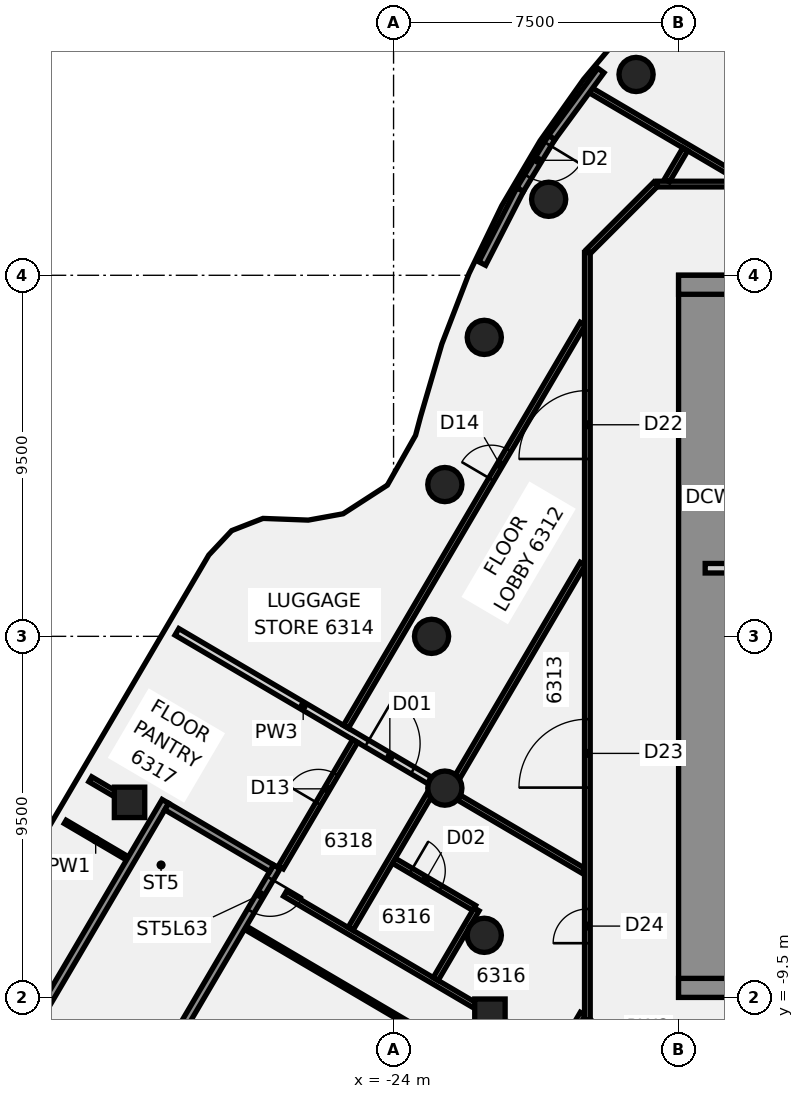
"""IFC4 building model, lengths in metres.
Left out: names, types, materials, properties, quantities, classifications, styles, units other than length and angle.
Written with IfcOpenShell. Run it as: python <this file> out.ifc"""

import sys

from ifc_helpers import new_model, si_unit, direction, frame, frame_2d, origin, origin_2d, place, context, subcontext, project, spatial, polyline, rectangle, circle, outline, extrude, element, fill, save


model = new_model("IFC4")
c1 = context("Model", 3, precision=1e-05, world=origin(), true_north=direction((0.0, 1.0)))
c2 = subcontext(c1, "Body", "Model", "MODEL_VIEW")
j1 = project(units=[si_unit("LENGTHUNIT", "METRE"), si_unit("PLANEANGLEUNIT", "RADIAN")], contexts=[c1])
p1 = place(None, origin())
s1 = spatial("IfcSite", under=j1, at=p1, CompositionType="ELEMENT")
p2 = place(p1, origin())
s2 = spatial("IfcBuilding", under=s1, at=p2, CompositionType="ELEMENT")
p3 = place(p2, frame((0.0, 0.0, 248.7)))
s3 = spatial("IfcBuildingStorey", under=s2, at=p3, CompositionType="ELEMENT", Elevation=248.7)
for number, where, z_axis, x_axis in (
    (1, (-17.619, 14.784, -0.14), (0.0, 0.0, 1.0), (1.0, 0.0, 0.0)),
    (2, (-19.919, 11.5, -0.14), (0.0, 0.0, 1.0), (1.0, 0.0, 0.0)),
    (3, (-21.613, 7.866, -0.14), (0.0, 0.0, 1.0), (1.0, 0.0, 0.0)),
    (4, (-22.651, 3.994, -0.14), (0.0, 0.0, 1.0), (1.0, 0.0, 0.0)),
    (5, (-23.0, 0.0, -0.14), (0.0, 0.0, 1.0), (1.0, 0.0, 0.0)),
    (6, (-22.651, -3.994, -0.14), (0.0, 0.0, 1.0), (1.0, 0.0, 0.0)),
    (7, (-21.613, -7.866, -0.14), (0.0, 0.0, 1.0), (1.0, 0.0, 0.0)),
):
    element("IfcColumn", number, at=place(p3, frame(where, z_axis=z_axis, x_axis=x_axis)), inside=s3, PredefinedType="COLUMN", context=c2, shape_type="SweptSolid", body=[
        extrude(circle(Radius=0.45, at=origin_2d()), origin(), (0.0, 0.0, 1.0), 3.56),
    ])
for number, where, z_axis, x_axis in (
    (8, (-21.464, -9.942, -0.139), (0.051, 0.003, 0.999), (-0.861, 0.507, 0.042)),
    (9, (-30.948, -4.368, -0.139), (0.023, -0.046, 0.999), (0.507, 0.861, 0.028)),
):
    element("IfcColumn", number, at=place(p3, frame(where, z_axis=z_axis, x_axis=x_axis)), inside=s3, PredefinedType="COLUMN", context=c2, shape_type="SweptSolid", body=[
        extrude(rectangle(XDim=0.8, YDim=0.8, at=origin_2d()), origin(), (0.0, 0.0, 1.0), 3.548),
    ])
p4 = place(p3, frame((-18.872, -10.128, 0.0), z_axis=(0.0, 0.0, 1.0), x_axis=(0.707106781187, -0.707106781187, 0.0)))
e10 = element("IfcWall", 10, at=p4, inside=s3, PredefinedType="PARTITIONING", context=c2, shape_type="SweptSolid", body=[
    extrude(rectangle(XDim=2.465, YDim=0.15, at=frame_2d((1.232, 0.0))), origin(), (0.0, 0.0, 1.0), 2.824),
])
p5 = place(p3, frame((-32.64, -4.882, 0.0), z_axis=(0.0, 0.0, 1.0), x_axis=(0.862207561559, -0.506555150789, 0.0)))
e11 = element("IfcWall", 11, at=p5, inside=s3, PredefinedType="PARTITIONING", context=c2, shape_type="SweptSolid", body=[
    extrude(rectangle(XDim=1.859, YDim=0.1, at=frame_2d((0.929, 0.0))), origin(), (0.0, 0.0, 1.0), 2.82),
])
p6 = place(p3, frame((-27.865, -7.687, 0.0), z_axis=(0.0, 0.0, 1.0), x_axis=(0.862208691121, -0.506553228156, 0.0)))
e12 = element("IfcWall", 12, at=p6, inside=s3, PredefinedType="PARTITIONING", context=c2, shape_type="SweptSolid", body=[
    extrude(rectangle(XDim=8.685, YDim=0.1, at=frame_2d((4.343, 0.0))), origin(), (0.0, 0.0, 1.0), 2.82),
])
p7 = place(p3, frame((-31.981, -3.76, 0.0), z_axis=(0.0, 0.0, 1.0), x_axis=(0.86206768602, -0.506793157728, 0.0)))
e13 = element("IfcWall", 13, at=p7, inside=s3, PredefinedType="PARTITIONING", context=c2, shape_type="SweptSolid", body=[
    extrude(rectangle(XDim=0.799, YDim=0.15, at=frame_2d((0.4, 0.0))), origin(), (0.0, 0.0, 1.0), 2.824),
])
p8 = place(p3, frame((-26.857, -6.773, 0.0), z_axis=(0.0, 0.0, 1.0), x_axis=(0.862091797668, -0.506752140985, 0.0)))
e14 = element("IfcWall", 14, at=p8, inside=s3, PredefinedType="PARTITIONING", context=c2, shape_type="SweptSolid", body=[
    extrude(rectangle(XDim=5.853, YDim=0.15, at=frame_2d((2.927, 0.0))), origin(), (0.0, 0.0, 1.0), 2.82),
])
p9 = place(p3, frame((-29.701, 0.118, 0.0), z_axis=(0.0, 0.0, 1.0), x_axis=(0.862110841902, -0.506719741351, 0.0)))
e15 = element("IfcWall", 15, at=p9, inside=s3, PredefinedType="PARTITIONING", context=c2, shape_type="SweptSolid", body=[
    extrude(rectangle(XDim=7.708, YDim=0.2, at=frame_2d((3.854, 0.0))), origin(), (0.0, 0.0, 1.0), 2.824),
])
p10 = place(p9, frame((5.799, 0.0, 0.0)))
e16 = element("IfcOpeningElement", 16, at=p10, cuts=e15, PredefinedType="OPENING", context=c2, shape_type="SweptSolid", body=[
    extrude(rectangle(XDim=1.4, YDim=2.1, at=frame_2d((0.7, 1.05))), frame((0.0, 0.11, 0.0), z_axis=(0.0, -1.0, 0.0), x_axis=(1.0, 0.0, 0.0)), (0.0, 0.0, 1.0), 0.22),
])
p11 = place(p3, frame((-22.275, -4.246, 0.0), z_axis=(0.0, 0.0, 1.0), x_axis=(0.862128807231, -0.506689174685, 0.0)))
e17 = element("IfcWall", 17, at=p11, inside=s3, PredefinedType="PARTITIONING", context=c2, shape_type="SweptSolid", body=[
    extrude(rectangle(XDim=3.805, YDim=0.15, at=frame_2d((1.902, 0.0))), origin(), (0.0, 0.0, 1.0), 2.824),
])
p12 = place(p3, frame((-23.992, -5.905, 0.0), z_axis=(0.0, 0.0, 1.0), x_axis=(0.862238889769, -0.506501823263, 0.0)))
e18 = element("IfcWall", 18, at=p12, inside=s3, PredefinedType="PARTITIONING", context=c2, shape_type="SweptSolid", body=[
    extrude(rectangle(XDim=2.45, YDim=0.15, at=frame_2d((1.225, 0.0))), origin(), (0.0, 0.0, 1.0), 2.824),
])
p13 = place(p12, frame((0.525, 0.0, 0.0)))
e19 = element("IfcOpeningElement", 19, at=p13, cuts=e18, PredefinedType="OPENING", context=c2, shape_type="SweptSolid", body=[
    extrude(rectangle(XDim=0.9, YDim=2.1, at=frame_2d((0.45, 1.05))), frame((0.0, 0.085, 0.0), z_axis=(0.0, -1.0, 0.0), x_axis=(1.0, 0.0, 0.0)), (0.0, 0.0, 1.0), 0.17),
])
p14 = place(p3, frame((-18.83, 14.376, 0.0), z_axis=(0.0, 0.0, 1.0), x_axis=(0.862085468811, -0.506762907547, 0.0)))
e20 = element("IfcWall", 20, at=p14, inside=s3, PredefinedType="PARTITIONING", context=c2, shape_type="SweptSolid", body=[
    extrude(rectangle(XDim=4.646, YDim=0.15, at=frame_2d((2.323, 0.0))), origin(), (0.0, 0.0, 1.0), 2.824),
])
p15 = place(p3, frame((-17.065, 11.9, 0.0), z_axis=(0.0, 0.0, 1.0), x_axis=(1.0, 0.0, 0.0)))
e21 = element("IfcWall", 21, at=p15, inside=s3, PredefinedType="PARTITIONING", context=c2, shape_type="SweptSolid", body=[
    extrude(rectangle(XDim=34.165, YDim=0.15, at=frame_2d((17.083, 0.0))), origin(), (0.0, 0.0, 1.0), 2.824),
])
p16 = place(p15, frame((22.4, 0.0, 0.0)))
e22 = element("IfcOpeningElement", 22, at=p16, cuts=e21, PredefinedType="OPENING", context=c2, shape_type="SweptSolid", body=[
    extrude(rectangle(XDim=1.8, YDim=2.1, at=frame_2d((0.9, 1.05))), frame((0.0, 0.085, 0.0), z_axis=(0.0, -1.0, 0.0), x_axis=(1.0, 0.0, 0.0)), (0.0, 0.0, 1.0), 0.17),
])
p17 = place(p15, frame((9.948, 0.0, 0.0)))
e23 = element("IfcOpeningElement", 23, at=p17, cuts=e21, PredefinedType="OPENING", context=c2, shape_type="SweptSolid", body=[
    extrude(rectangle(XDim=1.8, YDim=2.1, at=frame_2d((0.9, 1.05))), frame((0.0, 0.085, 0.0), z_axis=(0.0, -1.0, 0.0), x_axis=(1.0, 0.0, 0.0)), (0.0, 0.0, 1.0), 0.17),
])
p18 = place(p3, frame((-18.872, 10.128, 0.0), z_axis=(0.0, 0.0, 1.0), x_axis=(0.707106781187, 0.707106781187, 0.0)))
e24 = element("IfcWall", 24, at=p18, inside=s3, PredefinedType="PARTITIONING", context=c2, shape_type="SweptSolid", body=[
    extrude(rectangle(XDim=2.505, YDim=0.15, at=frame_2d((1.253, 0.0))), origin(), (0.0, 0.0, 1.0), 2.824),
])
p19 = place(p3, frame((-26.967, -6.082, 0.0), z_axis=(0.0, 0.0, 1.0), x_axis=(0.506735370339, 0.862101655518, 0.0)))
e25 = element("IfcWall", 25, at=p19, inside=s3, PredefinedType="PARTITIONING", context=c2, shape_type="SweptSolid", body=[
    extrude(rectangle(XDim=3.86, YDim=0.15, at=frame_2d((1.93, 0.0))), origin(), (0.0, 0.0, 1.0), 2.72),
])
p20 = place(p19, frame((1.95, 0.0, 0.0)))
e26 = element("IfcOpeningElement", 26, at=p20, cuts=e25, PredefinedType="OPENING", context=c2, shape_type="SweptSolid", body=[
    extrude(rectangle(XDim=0.9, YDim=2.1, at=frame_2d((0.45, 1.05))), frame((0.0, 0.085, 0.0), z_axis=(0.0, -1.0, 0.0), x_axis=(1.0, 0.0, 0.0)), (0.0, 0.0, 1.0), 0.17),
])
p21 = place(p3, frame((-25.254, -2.379, 0.0), z_axis=(0.0, 0.0, 1.0), x_axis=(0.506733850669, 0.862102548764, 0.0)))
e27 = element("IfcWall", 27, at=p21, inside=s3, PredefinedType="PARTITIONING", context=c2, shape_type="SweptSolid", body=[
    extrude(rectangle(XDim=12.3, YDim=0.15, at=frame_2d((6.15, 0.0))), origin(), (0.0, 0.0, 1.0), 2.824),
])
p22 = place(p21, frame((7.55, 0.0, 0.0)))
e28 = element("IfcOpeningElement", 28, at=p22, cuts=e27, PredefinedType="OPENING", context=c2, shape_type="SweptSolid", body=[
    extrude(rectangle(XDim=0.9, YDim=2.1, at=frame_2d((0.45, 1.05))), frame((0.0, 0.085, 0.0), z_axis=(0.0, -1.0, 0.0), x_axis=(1.0, 0.0, 0.0)), (0.0, 0.0, 1.0), 0.17),
])
p23 = place(p3, frame((-16.806, 11.995, 0.0), z_axis=(0.0, 0.0, 1.0), x_axis=(0.506627709985, 0.862164928233, 0.0)))
e29 = element("IfcWall", 29, at=p23, inside=s3, PredefinedType="PARTITIONING", context=c2, shape_type="SweptSolid", body=[
    extrude(rectangle(XDim=0.952, YDim=0.15, at=frame_2d((0.476, 0.0))), origin(), (0.0, 0.0, 1.0), 2.824),
])
p24 = place(p3, frame((-25.131, -7.695, 0.0), z_axis=(0.0, 0.0, 1.0), x_axis=(0.506385167167, 0.862307406018, 0.0)))
e30 = element("IfcWall", 30, at=p24, inside=s3, PredefinedType="PARTITIONING", context=c2, shape_type="SweptSolid", body=[
    extrude(rectangle(XDim=4.084, YDim=0.15, at=frame_2d((2.042, 0.0))), origin(), (0.0, 0.0, 1.0), 2.72),
])
p25 = place(p3, frame((-22.892, -9.016, 0.0), z_axis=(0.0, 0.0, 1.0), x_axis=(0.506789195044, 0.862070015594, 0.0)))
e31 = element("IfcWall", 31, at=p25, inside=s3, PredefinedType="PARTITIONING", context=c2, shape_type="SweptSolid", body=[
    extrude(rectangle(XDim=2.125, YDim=0.15, at=frame_2d((1.063, 0.0))), origin(), (0.0, 0.0, 1.0), 2.72),
])
p26 = place(p3, frame((-22.318, -3.698, 0.0), z_axis=(0.0, 0.0, 1.0), x_axis=(0.506670752559, 0.862139633993, 0.0)))
e32 = element("IfcWall", 32, at=p26, inside=s3, PredefinedType="PARTITIONING", context=c2, shape_type="SweptSolid", body=[
    extrude(rectangle(XDim=6.505, YDim=0.15, at=frame_2d((3.253, 0.0))), origin(), (0.0, 0.0, 1.0), 2.824),
])
p27 = place(p3, frame((-19.707, -11.097, 0.0), z_axis=(0.0, 0.0, 1.0), x_axis=(0.506775518667, 0.862078055445, 0.0)))
e33 = element("IfcWall", 33, at=p27, inside=s3, PredefinedType="PARTITIONING", context=c2, shape_type="SweptSolid", body=[
    extrude(rectangle(XDim=1.352, YDim=0.15, at=frame_2d((0.676, 0.0))), origin(), (0.0, 0.0, 1.0), 2.824),
])
p28 = place(p3, frame((-18.9, -10.1, 0.0), z_axis=(0.0, 0.0, 1.0), x_axis=(0.0, 1.0, 0.0)))
e34 = element("IfcWall", 34, at=p28, inside=s3, PredefinedType="PARTITIONING", context=c2, shape_type="SweptSolid", body=[
    extrude(rectangle(XDim=20.2, YDim=0.15, at=frame_2d((10.1, 0.0))), origin(), (0.0, 0.0, 1.0), 2.824),
])
p29 = place(p28, frame((14.767, 0.0, 0.0)))
e35 = element("IfcOpeningElement", 35, at=p29, cuts=e34, PredefinedType="OPENING", context=c2, shape_type="SweptSolid", body=[
    extrude(rectangle(XDim=1.8, YDim=2.1, at=frame_2d((0.9, 1.05))), frame((0.0, 0.085, 0.0), z_axis=(0.0, -1.0, 0.0), x_axis=(1.0, 0.0, 0.0)), (0.0, 0.0, 1.0), 0.17),
])
p30 = place(p28, frame((6.12, 0.0, 0.0)))
e36 = element("IfcOpeningElement", 36, at=p30, cuts=e34, PredefinedType="OPENING", context=c2, shape_type="SweptSolid", body=[
    extrude(rectangle(XDim=1.8, YDim=2.1, at=frame_2d((0.9, 1.05))), frame((0.0, 0.085, 0.0), z_axis=(0.0, -1.0, 0.0), x_axis=(1.0, 0.0, 0.0)), (0.0, 0.0, 1.0), 0.17),
])
p31 = place(p28, frame((2.026, 0.0, 0.0)))
e37 = element("IfcOpeningElement", 37, at=p31, cuts=e34, PredefinedType="OPENING", context=c2, shape_type="SweptSolid", body=[
    extrude(rectangle(XDim=0.9, YDim=2.1, at=frame_2d((0.45, 1.05))), frame((0.0, 0.085, 0.0), z_axis=(0.0, -1.0, 0.0), x_axis=(1.0, 0.0, 0.0)), (0.0, 0.0, 1.0), 0.17),
])
p32 = place(p3, frame((-18.543, 14.889, 0.0), z_axis=(0.0, 0.0, 1.0), x_axis=(-0.591779327433, -0.806100010931, 0.0)))
e38 = element("IfcWall", 38, at=p32, inside=s3, PredefinedType="SOLIDWALL", context=c2, shape_type="SweptSolid", body=[
    extrude(rectangle(XDim=2.189, YDim=0.2, at=frame_2d((1.095, 0.0))), origin(), (0.0, 0.0, 1.0), 3.42),
])
p33 = place(p3, frame((-20.668, 11.757, 0.0), z_axis=(0.0, 0.0, 1.0), x_axis=(-0.455802604441, -0.890080887215, 0.0)))
e39 = element("IfcWall", 39, at=p33, inside=s3, PredefinedType="SOLIDWALL", context=c2, shape_type="SweptSolid", body=[
    extrude(rectangle(XDim=2.189, YDim=0.2, at=frame_2d((1.095, 0.0))), origin(), (0.0, 0.0, 1.0), 3.42),
])
p34 = place(p3, frame((-19.839, 13.125, 0.0), z_axis=(0.0, 0.0, 1.0), x_axis=(-0.518687324951, -0.854964010316, 0.0)))
e40 = element("IfcWall", 40, at=p34, inside=s3, PredefinedType="SOLIDWALL", context=c2, shape_type="SweptSolid", body=[
    extrude(rectangle(XDim=1.599, YDim=0.2, at=frame_2d((0.8, 0.0))), origin(), (0.0, 0.0, 1.0), 3.42),
])
p35 = place(p34, frame((0.2, 0.0, 0.0)))
e41 = element("IfcOpeningElement", 41, at=p35, cuts=e40, PredefinedType="OPENING", context=c2, shape_type="SweptSolid", body=[
    extrude(rectangle(XDim=1.0, YDim=2.4, at=frame_2d((0.5, 1.2))), frame((0.0, 0.11, 0.0), z_axis=(0.0, -1.0, 0.0), x_axis=(1.0, 0.0, 0.0)), (0.0, 0.0, 1.0), 0.22),
])
p36 = place(p3, frame((-16.5, -9.25, 0.0), z_axis=(0.0, 0.0, 1.0), x_axis=(1.0, 0.0, 0.0)))
e42 = element("IfcWall", 42, at=p36, inside=s3, PredefinedType="SHEAR", context=c2, shape_type="SweptSolid", body=[
    extrude(rectangle(XDim=13.0, YDim=0.5, at=frame_2d((6.5, 0.0))), origin(), (0.0, 0.0, 1.0), 3.42),
])
p37 = place(p36, frame((4.15, 0.0, 0.0)))
e43 = element("IfcOpeningElement", 43, at=p37, cuts=e42, PredefinedType="OPENING", context=c2, shape_type="SweptSolid", body=[
    extrude(rectangle(XDim=1.4, YDim=2.1, at=frame_2d((0.7, 1.05))), frame((0.0, 0.26, 0.0), z_axis=(0.0, -1.0, 0.0), x_axis=(1.0, 0.0, 0.0)), (0.0, 0.0, 1.0), 0.52),
])
p38 = place(p36, frame((10.125, 0.0, 0.0)))
e44 = element("IfcOpeningElement", 44, at=p38, cuts=e42, PredefinedType="OPENING", context=c2, shape_type="SweptSolid", body=[
    extrude(rectangle(XDim=1.4, YDim=2.1, at=frame_2d((0.7, 1.05))), frame((0.0, 0.26, 0.0), z_axis=(0.0, -1.0, 0.0), x_axis=(1.0, 0.0, 0.0)), (0.0, 0.0, 1.0), 0.52),
])
p39 = place(p3, origin())
e45 = element("IfcWall", 45, at=p39, inside=s3, PredefinedType="SHEAR", context=c2, shape_type="SweptSolid", body=[
    extrude(outline(polyline([(-13.5, -8.125), (-16.0, -8.125), (-16.0, -5.625), (-13.5, -5.625), (-13.5, -5.375), (-16.0, -5.375), (-16.0, 5.375), (-13.5, 5.375), (-13.5, 5.625), (-16.0, 5.625), (-16.0, 8.125), (-13.5, 8.125), (-13.5, 9.0), (-16.0, 9.0), (-16.5, 9.0), (-16.5, -9.0), (-16.0, -9.0), (-13.5, -9.0), (-13.5, -8.125)])), origin(), (0.0, 0.0, 1.0), 3.42),
])
p40 = place(p3, frame((-16.5, 9.25, 0.0), z_axis=(0.0, 0.0, 1.0), x_axis=(1.0, 0.0, 0.0)))
e46 = element("IfcWall", 46, at=p40, inside=s3, PredefinedType="SHEAR", context=c2, shape_type="SweptSolid", body=[
    extrude(rectangle(XDim=13.0, YDim=0.5, at=frame_2d((6.5, 0.0))), origin(), (0.0, 0.0, 1.0), 3.42),
])
p41 = place(p3, frame((-15.8, 1.792, 0.0), z_axis=(0.0, 0.0, 1.0), x_axis=(1.0, 0.0, 0.0)))
e47 = element("IfcWall", 47, at=p41, inside=s3, PredefinedType="PARTITIONING", context=c2, shape_type="SweptSolid", body=[
    extrude(rectangle(XDim=2.3, YDim=0.25, at=frame_2d((1.15, 0.0))), origin(), (0.0, 0.0, 1.0), 3.42),
])
p42 = place(p3, frame((-27.073, -6.066, -0.14), z_axis=(0.0, 0.0, 1.0), x_axis=(-0.506720715415, -0.86211026938, 0.0)))
e48 = element("IfcWall", 48, at=p42, inside=s3, PredefinedType="SHEAR", context=c2, shape_type="SweptSolid", body=[
    extrude(rectangle(XDim=6.7, YDim=0.2, at=frame_2d((3.35, 0.0))), origin(), (0.0, 0.0, 1.0), 2.86),
])
p43 = place(p42, frame((0.35, 0.0, 0.0)))
e49 = element("IfcOpeningElement", 49, at=p43, cuts=e48, PredefinedType="OPENING", context=c2, shape_type="SweptSolid", body=[
    extrude(rectangle(XDim=1.0, YDim=2.1, at=frame_2d((0.5, 1.05))), frame((0.0, 0.11, 0.0), z_axis=(0.0, -1.0, 0.0), x_axis=(1.0, 0.0, 0.0)), (0.0, 0.0, 1.0), 0.22),
])
p44 = place(p3, frame((-30.004, -4.343, -0.14), z_axis=(0.0, 0.0, 1.0), x_axis=(-0.506720715415, -0.86211026938, 0.0)))
e50 = element("IfcWall", 50, at=p44, inside=s3, PredefinedType="SHEAR", context=c2, shape_type="SweptSolid", body=[
    extrude(rectangle(XDim=6.7, YDim=0.2, at=frame_2d((3.35, 0.0))), origin(), (0.0, 0.0, 1.0), 2.86),
])
p45 = place(p3, frame((-29.969, -4.48, -0.14), z_axis=(0.0, 0.0, 1.0), x_axis=(0.862102834216, -0.506733365032, 0.0)))
e51 = element("IfcWall", 51, at=p45, inside=s3, PredefinedType="SHEAR", context=c2, shape_type="SweptSolid", body=[
    extrude(rectangle(XDim=3.2, YDim=0.2, at=frame_2d((1.6, 0.0))), origin(), (0.0, 0.0, 1.0), 2.86),
])
p46 = place(p3, frame((0.0, 0.0, -0.14)))
e52 = element("IfcWall", 52, at=p46, inside=s3, PredefinedType="SHEAR", context=c2, shape_type="SweptSolid", body=[
    extrude(outline(polyline([(-33.212, -9.997), (-33.313, -10.169), (-30.555, -11.791), (-30.453, -11.619), (-33.212, -9.997)])), origin(), (0.0, 0.0, 1.0), 2.96),
])
p47 = place(p10, origin())
e53 = element("IfcDoor", 53, at=p47, inside=s3, OperationType="DOUBLE_DOOR_SINGLE_SWING", PredefinedType="DOOR", context=c2, shape_type="SweptSolid", body=[
    extrude(rectangle(XDim=1.4, YDim=2.1, at=frame_2d((0.7, 1.05))), frame((0.0, 0.025, 0.0), z_axis=(0.0, -1.0, 0.0), x_axis=(1.0, 0.0, 0.0)), (0.0, 0.0, 1.0), 0.05),
])
fill(e16, e53)
p48 = place(p13, frame((0.9, 0.0, 0.0), z_axis=(0.0, 0.0, 1.0), x_axis=(-1.0, 0.0, 0.0)))
e54 = element("IfcDoor", 54, at=p48, inside=s3, OperationType="SINGLE_SWING_LEFT", PredefinedType="DOOR", context=c2, shape_type="SweptSolid", body=[
    extrude(rectangle(XDim=0.9, YDim=2.1, at=frame_2d((0.45, 1.05))), frame((0.0, 0.025, 0.0), z_axis=(0.0, -1.0, 0.0), x_axis=(1.0, 0.0, 0.0)), (0.0, 0.0, 1.0), 0.05),
])
fill(e19, e54)
p49 = place(p20, origin())
e55 = element("IfcDoor", 55, at=p49, inside=s3, OperationType="SINGLE_SWING_LEFT", PredefinedType="DOOR", context=c2, shape_type="SweptSolid", body=[
    extrude(rectangle(XDim=0.9, YDim=2.1, at=frame_2d((0.45, 1.05))), frame((0.0, 0.025, 0.0), z_axis=(0.0, -1.0, 0.0), x_axis=(1.0, 0.0, 0.0)), (0.0, 0.0, 1.0), 0.05),
])
fill(e26, e55)
p50 = place(p22, origin())
e56 = element("IfcDoor", 56, at=p50, inside=s3, OperationType="SINGLE_SWING_LEFT", PredefinedType="DOOR", context=c2, shape_type="SweptSolid", body=[
    extrude(rectangle(XDim=0.9, YDim=2.1, at=frame_2d((0.45, 1.05))), frame((0.0, 0.025, 0.0), z_axis=(0.0, -1.0, 0.0), x_axis=(1.0, 0.0, 0.0)), (0.0, 0.0, 1.0), 0.05),
])
fill(e28, e56)
p51 = place(p29, frame((1.8, 0.0, 0.0), z_axis=(0.0, 0.0, 1.0), x_axis=(-1.0, 0.0, 0.0)))
e57 = element("IfcDoor", 57, at=p51, inside=s3, OperationType="DOUBLE_DOOR_SINGLE_SWING", PredefinedType="DOOR", context=c2, shape_type="SweptSolid", body=[
    extrude(rectangle(XDim=1.8, YDim=2.1, at=frame_2d((0.9, 1.05))), frame((0.0, 0.025, 0.0), z_axis=(0.0, -1.0, 0.0), x_axis=(1.0, 0.0, 0.0)), (0.0, 0.0, 1.0), 0.05),
])
fill(e35, e57)
p52 = place(p30, origin())
e58 = element("IfcDoor", 58, at=p52, inside=s3, OperationType="DOUBLE_DOOR_SINGLE_SWING", PredefinedType="DOOR", context=c2, shape_type="SweptSolid", body=[
    extrude(rectangle(XDim=1.8, YDim=2.1, at=frame_2d((0.9, 1.05))), frame((0.0, 0.025, 0.0), z_axis=(0.0, -1.0, 0.0), x_axis=(1.0, 0.0, 0.0)), (0.0, 0.0, 1.0), 0.05),
])
fill(e36, e58)
p53 = place(p31, origin())
e59 = element("IfcDoor", 59, at=p53, inside=s3, OperationType="SINGLE_SWING_RIGHT", PredefinedType="DOOR", context=c2, shape_type="SweptSolid", body=[
    extrude(rectangle(XDim=0.9, YDim=2.1, at=frame_2d((0.45, 1.05))), frame((0.0, 0.025, 0.0), z_axis=(0.0, -1.0, 0.0), x_axis=(1.0, 0.0, 0.0)), (0.0, 0.0, 1.0), 0.05),
])
fill(e37, e59)
p54 = place(p35, origin())
e60 = element("IfcDoor", 60, at=p54, inside=s3, OperationType="SINGLE_SWING_LEFT", PredefinedType="DOOR", context=c2, shape_type="SweptSolid", body=[
    extrude(rectangle(XDim=1.0, YDim=2.4, at=frame_2d((0.5, 1.2))), frame((0.0, 0.025, 0.0), z_axis=(0.0, -1.0, 0.0), x_axis=(1.0, 0.0, 0.0)), (0.0, 0.0, 1.0), 0.05),
])
fill(e41, e60)
p55 = place(p43, origin())
e61 = element("IfcDoor", 61, at=p55, inside=s3, OperationType="SINGLE_SWING_LEFT", PredefinedType="DOOR", context=c2, shape_type="SweptSolid", body=[
    extrude(rectangle(XDim=1.0, YDim=2.1, at=frame_2d((0.5, 1.05))), frame((0.0, 0.025, 0.0), z_axis=(0.0, -1.0, 0.0), x_axis=(1.0, 0.0, 0.0)), (0.0, 0.0, 1.0), 0.05),
])
fill(e49, e61)
save(model, sys.argv[1])
